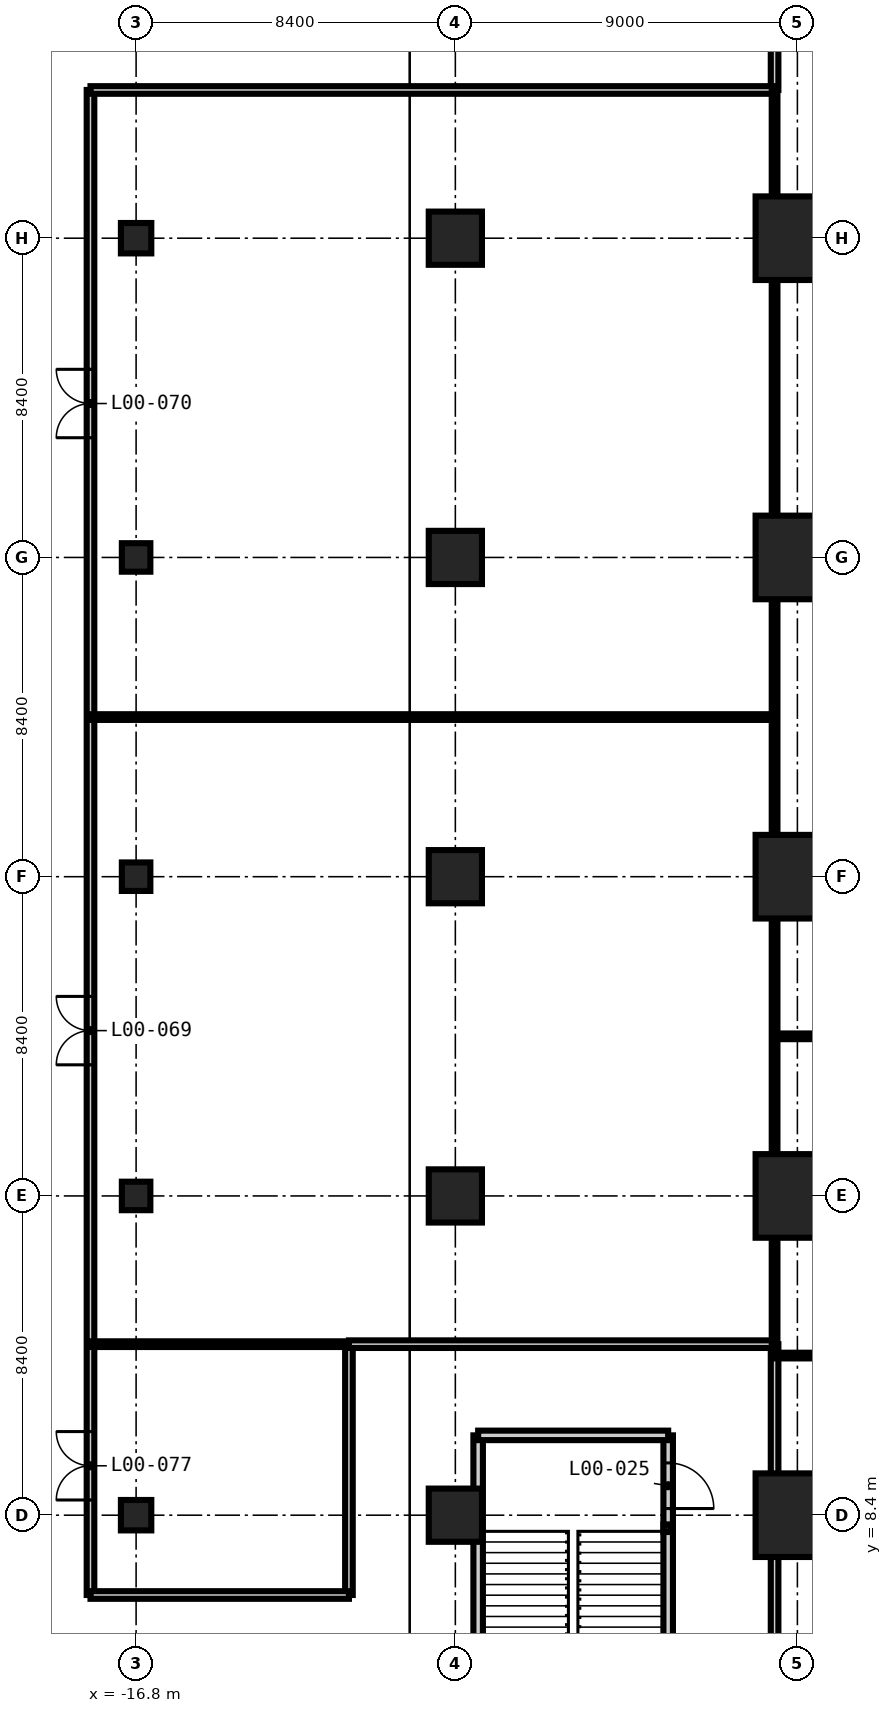
"""IFC4 building model, lengths in metres.
Left out: names, types, materials, properties, quantities, classifications, styles, units other than length and angle.
Written with IfcOpenShell. Run it as: python <this file> out.ifc"""

import sys

from ifc_helpers import new_model, si_unit, direction, frame, frame_2d, origin, origin_2d, place, context, subcontext, project, spatial, rectangle, hollow_rectangle, extrude, element, fill, save


model = new_model("IFC4")
c1 = context("Model", 3, precision=1e-05, world=origin(), true_north=direction((0.0, 1.0)))
c2 = subcontext(c1, "Body", "Model", "MODEL_VIEW")
j1 = project(units=[si_unit("LENGTHUNIT", "METRE"), si_unit("PLANEANGLEUNIT", "RADIAN")], contexts=[c1])
p1 = place(None, origin())
s1 = spatial("IfcSite", under=j1, at=p1, CompositionType="ELEMENT")
p2 = place(p1, origin())
s2 = spatial("IfcBuilding", under=s1, at=p2, CompositionType="ELEMENT")
p3 = place(p2, origin())
s3 = spatial("IfcBuildingStorey", under=s2, at=p3, CompositionType="ELEMENT", Elevation=0.0)
for number, where, z_axis, x_axis in (
    (1, (0.6, 8.4, -0.3), (0.0, 0.0, 1.0), (1.0, 0.0, 0.0)),
    (2, (0.6, 16.8, -0.3), (0.0, 0.0, 1.0), (1.0, 0.0, 0.0)),
    (3, (0.6, 25.2, -0.3), (0.0, 0.0, 1.0), (1.0, 0.0, 0.0)),
    (4, (0.6, 33.6, -0.3), (0.0, 0.0, 1.0), (1.0, 0.0, 0.0)),
    (5, (0.6, 42.0, -0.3), (0.0, 0.0, 1.0), (1.0, 0.0, 0.0)),
):
    element("IfcColumn", number, at=place(p3, frame(where, z_axis=z_axis, x_axis=x_axis)), inside=s3, PredefinedType="COLUMN", context=c2, shape_type="SweptSolid", body=[
        extrude(rectangle(XDim=2.2, YDim=2.2, at=origin_2d()), origin(), (0.0, 0.0, 1.0), 6.0),
    ])
p4 = place(p3, frame((-16.8, 8.4, -0.3), z_axis=(0.0, 0.0, 1.0), x_axis=(1.0, 0.0, 0.0)))
e6 = element("IfcColumn", 6, at=p4, inside=s3, PredefinedType="COLUMN", context=c2, shape_type="SweptSolid", body=[
    extrude(rectangle(XDim=0.8, YDim=0.8, at=origin_2d()), origin(), (0.0, 0.0, 1.0), 6.0),
])
for number, where, z_axis, x_axis in (
    (7, (-16.8, 16.8, -0.5), (0.0, 0.0, 1.0), (1.0, 0.0, 0.0)),
    (8, (-16.8, 25.2, -0.5), (0.0, 0.0, 1.0), (1.0, 0.0, 0.0)),
    (9, (-16.8, 33.6, -0.5), (0.0, 0.0, 1.0), (1.0, 0.0, 0.0)),
):
    element("IfcColumn", number, at=place(p3, frame(where, z_axis=z_axis, x_axis=x_axis)), inside=s3, PredefinedType="COLUMN", context=c2, shape_type="SweptSolid", body=[
        extrude(rectangle(XDim=0.75, YDim=0.75, at=origin_2d()), origin(), (0.0, 0.0, 1.0), 6.2),
    ])
p5 = place(p3, frame((-16.8, 42.0, -0.3), z_axis=(0.0, 0.0, 1.0), x_axis=(1.0, 0.0, 0.0)))
e10 = element("IfcColumn", 10, at=p5, inside=s3, PredefinedType="COLUMN", context=c2, shape_type="SweptSolid", body=[
    extrude(rectangle(XDim=0.8, YDim=0.8, at=origin_2d()), origin(), (0.0, 0.0, 1.0), 6.0),
])
for number, where, z_axis, x_axis in (
    (11, (-8.4, 8.4, -0.3), (0.0, 0.0, 1.0), (1.0, 0.0, 0.0)),
    (12, (-8.4, 16.8, -0.3), (0.0, 0.0, 1.0), (1.0, 0.0, 0.0)),
    (13, (-8.4, 25.2, -0.3), (0.0, 0.0, 1.0), (1.0, 0.0, 0.0)),
    (14, (-8.4, 33.6, -0.3), (0.0, 0.0, 1.0), (1.0, 0.0, 0.0)),
    (15, (-8.4, 42.0, -0.3), (0.0, 0.0, 1.0), (1.0, 0.0, 0.0)),
):
    element("IfcColumn", number, at=place(p3, frame(where, z_axis=z_axis, x_axis=x_axis)), inside=s3, PredefinedType="COLUMN", context=c2, shape_type="SweptSolid", body=[
        extrude(rectangle(XDim=1.4, YDim=1.4, at=origin_2d()), origin(), (0.0, 0.0, 1.0), 6.0),
    ])
p6 = place(p3, frame((-18.0, 6.3, 0.0), z_axis=(0.0, 0.0, 1.0), x_axis=(0.0, 1.0, 0.0)))
e16 = element("IfcWall", 16, at=p6, inside=s3, PredefinedType="PARTITIONING", context=c2, shape_type="SweptSolid", body=[
    extrude(rectangle(XDim=39.6, YDim=0.2, at=frame_2d((19.8, 0.0))), origin(), (0.0, 0.0, 1.0), 5.7),
])
p7 = place(p6, frame((13.95, 0.0, 0.0)))
e17 = element("IfcOpeningElement", 17, at=p7, cuts=e16, PredefinedType="OPENING", context=c2, shape_type="SweptSolid", body=[
    extrude(rectangle(XDim=1.8, YDim=2.7, at=frame_2d((0.9, 1.35))), frame((0.0, 0.11, 0.0), z_axis=(0.0, -1.0, 0.0), x_axis=(1.0, 0.0, 0.0)), (0.0, 0.0, 1.0), 0.22),
])
p8 = place(p6, frame((30.45, 0.0, 0.0)))
e18 = element("IfcOpeningElement", 18, at=p8, cuts=e16, PredefinedType="OPENING", context=c2, shape_type="SweptSolid", body=[
    extrude(rectangle(XDim=1.8, YDim=2.7, at=frame_2d((0.9, 1.35))), frame((0.0, 0.11, 0.0), z_axis=(0.0, -1.0, 0.0), x_axis=(1.0, 0.0, 0.0)), (0.0, 0.0, 1.0), 0.22),
])
p9 = place(p6, frame((2.5, 0.0, 0.0)))
e19 = element("IfcOpeningElement", 19, at=p9, cuts=e16, PredefinedType="OPENING", context=c2, shape_type="SweptSolid", body=[
    extrude(rectangle(XDim=1.8, YDim=2.7, at=frame_2d((0.9, 1.35))), frame((0.0, 0.11, 0.0), z_axis=(0.0, -1.0, 0.0), x_axis=(1.0, 0.0, 0.0)), (0.0, 0.0, 1.0), 0.22),
])
p10 = place(p3, frame((-11.2, 6.3, 0.0), z_axis=(0.0, 0.0, 1.0), x_axis=(0.0, 1.0, 0.0)))
e20 = element("IfcWall", 20, at=p10, inside=s3, PredefinedType="PARTITIONING", context=c2, shape_type="SweptSolid", body=[
    extrude(rectangle(XDim=6.6, YDim=0.2, at=frame_2d((3.3, 0.0))), origin(), (0.0, 0.0, 1.0), 5.7),
])
p11 = place(p3, frame((0.0, 2.4, 0.0), z_axis=(0.0, 0.0, 1.0), x_axis=(0.0, 1.0, 0.0)))
e21 = element("IfcWall", 21, at=p11, inside=s3, PredefinedType="PARTITIONING", context=c2, shape_type="SweptSolid", body=[
    extrude(rectangle(XDim=10.5, YDim=0.2, at=frame_2d((5.25, 0.0))), origin(), (0.0, 0.0, 1.0), 5.7),
])
p12 = place(p3, frame((0.0, 45.9, 0.0), z_axis=(0.0, 0.0, 1.0), x_axis=(0.0, 1.0, 0.0)))
e22 = element("IfcWall", 22, at=p12, inside=s3, PredefinedType="PARTITIONING", context=c2, shape_type="SweptSolid", body=[
    extrude(rectangle(XDim=12.9, YDim=0.2, at=frame_2d((6.45, 0.0))), origin(), (0.0, 0.0, 1.0), 5.7),
])
p13 = place(p3, frame((-18.0, 6.3, 0.0), z_axis=(0.0, 0.0, 1.0), x_axis=(1.0, 0.0, 0.0)))
e23 = element("IfcWall", 23, at=p13, inside=s3, PredefinedType="PARTITIONING", context=c2, shape_type="SweptSolid", body=[
    extrude(rectangle(XDim=6.8, YDim=0.2, at=frame_2d((3.4, 0.0))), origin(), (0.0, 0.0, 1.0), 5.7),
])
p14 = place(p3, frame((-18.0, 45.9, 0.0), z_axis=(0.0, 0.0, 1.0), x_axis=(1.0, 0.0, 0.0)))
e24 = element("IfcWall", 24, at=p14, inside=s3, PredefinedType="PARTITIONING", context=c2, shape_type="SweptSolid", body=[
    extrude(rectangle(XDim=18.0, YDim=0.2, at=frame_2d((9.0, 0.0))), origin(), (0.0, 0.0, 1.0), 5.7),
])
p15 = place(p3, frame((0.0, 12.9, 0.0), z_axis=(0.0, 0.0, 1.0), x_axis=(-1.0, 0.0, 0.0)))
e25 = element("IfcWall", 25, at=p15, inside=s3, PredefinedType="PARTITIONING", context=c2, shape_type="SweptSolid", body=[
    extrude(rectangle(XDim=11.2, YDim=0.2, at=frame_2d((5.6, 0.0))), origin(), (0.0, 0.0, 1.0), 5.7),
])
p16 = place(p3, frame((0.0, 12.9, 0.0), z_axis=(0.0, 0.0, 1.0), x_axis=(0.0, 1.0, 0.0)))
e26 = element("IfcWall", 26, at=p16, inside=s3, PredefinedType="PARTITIONING", context=c2, shape_type="SweptSolid", body=[
    extrude(rectangle(XDim=33.0, YDim=0.15, at=frame_2d((16.5, 0.0))), origin(), (0.0, 0.0, 1.0), 5.7),
])
p17 = place(p3, frame((0.0, 12.6, 0.0), z_axis=(0.0, 0.0, 1.0), x_axis=(1.0, 0.0, 0.0)))
e27 = element("IfcWall", 27, at=p17, inside=s3, PredefinedType="PARTITIONING", context=c2, shape_type="SweptSolid", body=[
    extrude(rectangle(XDim=7.9, YDim=0.15, at=frame_2d((3.95, 0.0))), origin(), (0.0, 0.0, 1.0), 5.7),
])
p18 = place(p3, frame((-18.0, 12.9, 0.0), z_axis=(0.0, 0.0, 1.0), x_axis=(1.0, 0.0, 0.0)))
e28 = element("IfcWall", 28, at=p18, inside=s3, PredefinedType="PARTITIONING", context=c2, shape_type="SweptSolid", body=[
    extrude(rectangle(XDim=6.8, YDim=0.15, at=frame_2d((3.4, 0.0))), origin(), (0.0, 0.0, 1.0), 5.7),
])
p19 = place(p3, frame((0.0, 21.0, 0.0), z_axis=(0.0, 0.0, 1.0), x_axis=(1.0, 0.0, 0.0)))
e29 = element("IfcWall", 29, at=p19, inside=s3, PredefinedType="PARTITIONING", context=c2, shape_type="SweptSolid", body=[
    extrude(rectangle(XDim=7.9, YDim=0.15, at=frame_2d((3.95, 0.0))), origin(), (0.0, 0.0, 1.0), 5.7),
])
p20 = place(p3, frame((-18.0, 29.4, 0.0), z_axis=(0.0, 0.0, 1.0), x_axis=(1.0, 0.0, 0.0)))
e30 = element("IfcWall", 30, at=p20, inside=s3, PredefinedType="PARTITIONING", context=c2, shape_type="SweptSolid", body=[
    extrude(rectangle(XDim=18.0, YDim=0.15, at=frame_2d((9.0, 0.0))), origin(), (0.0, 0.0, 1.0), 5.7),
])
p21 = place(p3, frame((0.0, 42.0, 0.0), z_axis=(0.0, 0.0, 1.0), x_axis=(1.0, 0.0, 0.0)))
e31 = element("IfcWall", 31, at=p21, inside=s3, PredefinedType="PARTITIONING", context=c2, shape_type="SweptSolid", body=[
    extrude(rectangle(XDim=7.9, YDim=0.15, at=frame_2d((3.95, 0.0))), origin(), (0.0, 0.0, 1.0), 5.7),
])
p22 = place(p3, frame((-7.8, 0.0, 0.0), z_axis=(0.0, 0.0, 1.0), x_axis=(0.0, 1.0, 0.0)))
e32 = element("IfcWall", 32, at=p22, inside=s3, PredefinedType="PARTITIONING", context=c2, shape_type="SweptSolid", body=[
    extrude(rectangle(XDim=10.5, YDim=0.25, at=frame_2d((5.25, 0.0))), origin(), (0.0, 0.0, 1.0), 5.7),
])
p23 = place(p3, frame((-2.8, 0.0, 0.0), z_axis=(0.0, 0.0, 1.0), x_axis=(0.0, 1.0, 0.0)))
e33 = element("IfcWall", 33, at=p23, inside=s3, PredefinedType="PARTITIONING", context=c2, shape_type="SweptSolid", body=[
    extrude(rectangle(XDim=10.5, YDim=0.25, at=frame_2d((5.25, 0.0))), origin(), (0.0, 0.0, 1.0), 5.7),
])
p24 = place(p23, frame((8.575, 0.0, 0.0)))
e34 = element("IfcOpeningElement", 34, at=p24, cuts=e33, PredefinedType="OPENING", context=c2, shape_type="SweptSolid", body=[
    extrude(rectangle(XDim=1.2, YDim=2.2, at=frame_2d((0.6, 1.1))), frame((0.0, 0.135, 0.0), z_axis=(0.0, -1.0, 0.0), x_axis=(1.0, 0.0, 0.0)), (0.0, 0.0, 1.0), 0.27),
])
p25 = place(p3, frame((-7.8, 10.5, 0.0), z_axis=(0.0, 0.0, 1.0), x_axis=(1.0, 0.0, 0.0)))
e35 = element("IfcWall", 35, at=p25, inside=s3, PredefinedType="PARTITIONING", context=c2, shape_type="SweptSolid", body=[
    extrude(rectangle(XDim=5.0, YDim=0.25, at=frame_2d((2.5, 0.0))), origin(), (0.0, 0.0, 1.0), 5.7),
])
p26 = place(p3, frame((-2.825, 8.058, -0.3), z_axis=(0.0, 0.0, 1.0), x_axis=(1.0, 0.0, 0.0)))
e36 = element("IfcColumn", 36, at=p26, inside=s3, PredefinedType="COLUMN", context=c2, shape_type="SweptSolid", body=[
    extrude(hollow_rectangle(XDim=0.2, YDim=0.2, WallThickness=0.01, at=origin_2d()), origin(), (0.0, 0.0, 1.0), 6.0),
])
p27 = place(p24, frame((1.2, 0.0, 0.0), z_axis=(0.0, 0.0, 1.0), x_axis=(-1.0, 0.0, 0.0)))
e37 = element("IfcDoor", 37, at=p27, inside=s3, OperationType="SINGLE_SWING_RIGHT", PredefinedType="DOOR", context=c2, shape_type="SweptSolid", body=[
    extrude(rectangle(XDim=1.2, YDim=2.2, at=frame_2d((0.6, 1.1))), frame((0.0, 0.025, 0.0), z_axis=(0.0, -1.0, 0.0), x_axis=(1.0, 0.0, 0.0)), (0.0, 0.0, 1.0), 0.05),
])
fill(e34, e37)
p28 = place(p7, origin())
e38 = element("IfcDoor", 38, at=p28, inside=s3, OperationType="DOUBLE_DOOR_DOUBLE_SWING", PredefinedType="DOOR", context=c2, shape_type="SweptSolid", body=[
    extrude(rectangle(XDim=1.8, YDim=2.7, at=frame_2d((0.9, 1.35))), frame((0.0, 0.025, 0.0), z_axis=(0.0, -1.0, 0.0), x_axis=(1.0, 0.0, 0.0)), (0.0, 0.0, 1.0), 0.05),
])
fill(e17, e38)
p29 = place(p8, origin())
e39 = element("IfcDoor", 39, at=p29, inside=s3, OperationType="DOUBLE_DOOR_DOUBLE_SWING", PredefinedType="DOOR", context=c2, shape_type="SweptSolid", body=[
    extrude(rectangle(XDim=1.8, YDim=2.7, at=frame_2d((0.9, 1.35))), frame((0.0, 0.025, 0.0), z_axis=(0.0, -1.0, 0.0), x_axis=(1.0, 0.0, 0.0)), (0.0, 0.0, 1.0), 0.05),
])
fill(e18, e39)
p30 = place(p9, origin())
e40 = element("IfcDoor", 40, at=p30, inside=s3, OperationType="DOUBLE_DOOR_DOUBLE_SWING", PredefinedType="DOOR", context=c2, shape_type="SweptSolid", body=[
    extrude(rectangle(XDim=1.8, YDim=2.7, at=frame_2d((0.9, 1.35))), frame((0.0, 0.025, 0.0), z_axis=(0.0, -1.0, 0.0), x_axis=(1.0, 0.0, 0.0)), (0.0, 0.0, 1.0), 0.05),
])
fill(e19, e40)
save(model, sys.argv[1])
